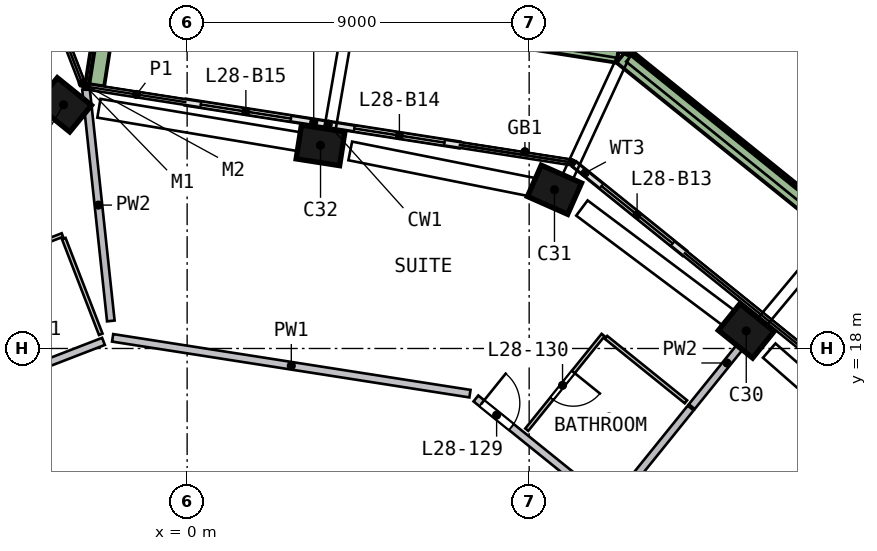
"""IFC4 building model, lengths in metres.
Left out: names, types, materials, properties, quantities, classifications, styles, units other than length and angle.
Written with IfcOpenShell. Run it as: python <this file> out.ifc"""

import sys

from ifc_helpers import new_model, si_unit, direction, frame, frame_2d, origin, origin_2d, place, context, subcontext, project, spatial, rectangle, extrude, element, fill, save


model = new_model("IFC4")
c1 = context("Model", 3, precision=1e-05, world=origin(), true_north=direction((0.0, 1.0)))
c2 = subcontext(c1, "Body", "Model", "MODEL_VIEW")
j1 = project(units=[si_unit("LENGTHUNIT", "METRE"), si_unit("PLANEANGLEUNIT", "RADIAN")], contexts=[c1])
p1 = place(None, origin())
s1 = spatial("IfcSite", under=j1, at=p1, CompositionType="ELEMENT")
p2 = place(p1, origin())
s2 = spatial("IfcBuilding", under=s1, at=p2, CompositionType="ELEMENT")
p3 = place(p2, frame((0.0, 0.0, 118.5)))
s3 = spatial("IfcBuildingStorey", under=s2, at=p3, CompositionType="ELEMENT", Elevation=118.5)
p4 = place(p3, frame((-3.955, 26.309, 0.0), z_axis=(-0.068478669, -0.1563623, 0.985323045), x_axis=(-0.37143503, 0.920634632, 0.120282553)))
e1 = element("IfcColumn", 1, at=p4, inside=s3, PredefinedType="COLUMN", context=c2, shape_type="SweptSolid", body=[
    extrude(rectangle(XDim=0.8, YDim=0.8, at=origin_2d()), origin(), (0.0, 0.0, 1.0), 3.045),
])
p5 = place(p3, frame((14.819, 18.378, 0.0), z_axis=(-0.087981597, 0.069786874, 0.99367451), x_axis=(-0.773238231, 0.624093395, -0.11229458)))
e2 = element("IfcColumn", 2, at=p5, inside=s3, PredefinedType="COLUMN", context=c2, shape_type="SweptSolid", body=[
    extrude(rectangle(XDim=1.15, YDim=0.9, at=origin_2d()), origin(), (0.0, 0.0, 1.0), 3.019),
])
p6 = place(p3, frame((9.794, 22.122, 0.0), z_axis=(-0.105576619, 0.045755258, 0.993357959), x_axis=(0.908058308, -0.402729542, 0.11506096)))
e3 = element("IfcColumn", 3, at=p6, inside=s3, PredefinedType="COLUMN", context=c2, shape_type="SweptSolid", body=[
    extrude(rectangle(XDim=1.15, YDim=0.9, at=origin_2d()), origin(), (0.0, 0.0, 1.0), 3.02),
])
p7 = place(p3, frame((3.644, 23.325, 0.0), z_axis=(-0.111108905, 0.016415653, 0.993672651), x_axis=(-0.981734689, 0.153568339, -0.112311022)))
e4 = element("IfcColumn", 4, at=p7, inside=s3, PredefinedType="COLUMN", context=c2, shape_type="SweptSolid", body=[
    extrude(rectangle(XDim=1.15, YDim=0.9, at=origin_2d()), origin(), (0.0, 0.0, 1.0), 3.019),
])
p8 = place(p3, frame((-3.112, 24.432, 0.0), z_axis=(-0.116057669, -0.01575992, 0.993117436), x_axis=(0.771555546, -0.631092639, 0.08015061)))
e5 = element("IfcColumn", 5, at=p8, inside=s3, PredefinedType="COLUMN", context=c2, shape_type="SweptSolid", body=[
    extrude(rectangle(XDim=1.15, YDim=0.9, at=origin_2d()), origin(), (0.0, 0.0, 1.0), 3.021),
])
p9 = place(p3, frame((13.086, 20.514, 0.0), z_axis=(0.0, 0.0, 1.0), x_axis=(-0.778455565, 0.627699716, 0.0)))
e6 = element("IfcWall", 6, at=p9, inside=s3, PredefinedType="SOLIDWALL", context=c2, shape_type="SweptSolid", body=[
    extrude(rectangle(XDim=3.71, YDim=0.15, at=frame_2d((1.855, 0.0))), origin(), (0.0, 0.0, 1.0), 2.935),
])
p10 = place(p9, frame((0.4, 0.0, 0.0)))
e7 = element("IfcOpeningElement", 7, at=p10, cuts=e6, PredefinedType="OPENING", context=c2, shape_type="SweptSolid", body=[
    extrude(rectangle(XDim=2.4, YDim=2.4, at=frame_2d((1.2, 1.2))), frame((0.0, 0.085, 0.0), z_axis=(0.0, -1.0, 0.0), x_axis=(1.0, 0.0, 0.0)), (0.0, 0.0, 1.0), 0.17),
])
p11 = place(p3, frame((7.167, 23.357, 0.0), z_axis=(0.0, 0.0, 1.0), x_axis=(-0.988005, 0.154421887, 0.0)))
e8 = element("IfcWall", 8, at=p11, inside=s3, PredefinedType="SOLIDWALL", context=c2, shape_type="SweptSolid", body=[
    extrude(rectangle(XDim=3.475, YDim=0.15, at=frame_2d((1.738, 0.0))), origin(), (0.0, 0.0, 1.0), 2.935),
])
p12 = place(p11, frame((0.4, 0.0, 0.0)))
e9 = element("IfcOpeningElement", 9, at=p12, cuts=e8, PredefinedType="OPENING", context=c2, shape_type="SweptSolid", body=[
    extrude(rectangle(XDim=2.4, YDim=2.4, at=frame_2d((1.2, 1.2))), frame((0.0, 0.085, 0.0), z_axis=(0.0, -1.0, 0.0), x_axis=(1.0, 0.0, 0.0)), (0.0, 0.0, 1.0), 0.17),
])
p13 = place(p3, frame((3.733, 23.894, 0.0), z_axis=(0.0, 0.0, 1.0), x_axis=(-0.98801905, 0.154331968, 0.0)))
e10 = element("IfcWall", 10, at=p13, inside=s3, PredefinedType="SOLIDWALL", context=c2, shape_type="SweptSolid", body=[
    extrude(rectangle(XDim=3.814, YDim=0.15, at=frame_2d((1.907, 0.0))), origin(), (0.0, 0.0, 1.0), 2.935),
])
p14 = place(p13, frame((1.014, 0.0, 0.0)))
e11 = element("IfcOpeningElement", 11, at=p14, cuts=e10, PredefinedType="OPENING", context=c2, shape_type="SweptSolid", body=[
    extrude(rectangle(XDim=2.4, YDim=2.4, at=frame_2d((1.2, 1.2))), frame((0.0, 0.085, 0.0), z_axis=(0.0, -1.0, 0.0), x_axis=(1.0, 0.0, 0.0)), (0.0, 0.0, 1.0), 0.17),
])
p15 = place(p3, frame((21.749, 17.415, 0.0), z_axis=(0.0, 0.0, 1.0), x_axis=(-0.778460183, 0.627693988, 0.0)))
e12 = element("IfcWall", 12, at=p15, inside=s3, PredefinedType="SOLIDWALL", context=c2, shape_type="SweptSolid", body=[
    extrude(rectangle(XDim=13.223, YDim=0.5, at=frame_2d((6.612, 0.0))), origin(), (0.0, 0.0, 1.0), 0.7),
])
p16 = place(p3, frame((11.337, 25.767, 0.0), z_axis=(0.0, 0.0, 1.0), x_axis=(-0.988014238, 0.15436277, 0.0)))
e13 = element("IfcWall", 13, at=p16, inside=s3, PredefinedType="SOLIDWALL", context=c2, shape_type="SweptSolid", body=[
    extrude(rectangle(XDim=13.724, YDim=0.5, at=frame_2d((6.862, 0.0))), origin(), (0.0, 0.0, 1.0), 0.7),
])
p17 = place(p3, frame((-2.014, 27.6, 0.0), z_axis=(0.0, 0.0, 1.0), x_axis=(-0.154313416, -0.988021948, 0.0)))
e14 = element("IfcWall", 14, at=p17, inside=s3, PredefinedType="SOLIDWALL", context=c2, shape_type="SweptSolid", body=[
    extrude(rectangle(XDim=2.699, YDim=0.5, at=frame_2d((1.35, 0.0))), origin(), (0.0, 0.0, 1.0), 0.7),
])
p18 = place(p3, frame((-2.201, 18.187, 0.0), z_axis=(0.0, 0.0, 1.0), x_axis=(-0.932828306, -0.360321179, 0.0)))
e15 = element("IfcWall", 15, at=p18, inside=s3, PredefinedType="SOLIDWALL", context=c2, shape_type="SweptSolid", body=[
    extrude(rectangle(XDim=3.4, YDim=0.2, at=frame_2d((1.7, 0.0))), origin(), (0.0, 0.0, 1.0), 3.0),
])
p19 = place(p3, frame((7.442, 16.811, 0.0), z_axis=(0.0, 0.0, 1.0), x_axis=(-0.988012767, 0.154372184, 0.0)))
e16 = element("IfcWall", 16, at=p19, inside=s3, PredefinedType="SOLIDWALL", context=c2, shape_type="SweptSolid", body=[
    extrude(rectangle(XDim=9.516, YDim=0.2, at=frame_2d((4.758, 0.0))), origin(), (0.0, 0.0, 1.0), 3.0),
])
p20 = place(p3, frame((7.599, 16.685, 0.0), z_axis=(0.0, 0.0, 1.0), x_axis=(0.778469608, -0.6276823, 0.0)))
e17 = element("IfcWall", 17, at=p20, inside=s3, PredefinedType="SOLIDWALL", context=c2, shape_type="SweptSolid", body=[
    extrude(rectangle(XDim=9.115, YDim=0.2, at=frame_2d((4.558, 0.0))), origin(), (0.0, 0.0, 1.0), 3.0),
])
p21 = place(p20, frame((0.2, 0.0, 0.0)))
e18 = element("IfcOpeningElement", 18, at=p21, cuts=e17, PredefinedType="OPENING", context=c2, shape_type="SweptSolid", body=[
    extrude(rectangle(XDim=1.0, YDim=2.1, at=frame_2d((0.5, 1.05))), frame((0.0, 0.11, 0.0), z_axis=(0.0, -1.0, 0.0), x_axis=(1.0, 0.0, 0.0)), (0.0, 0.0, 1.0), 0.22),
])
p22 = place(p3, frame((-2.661, 24.822, 0.0), z_axis=(0.0, 0.0, 1.0), x_axis=(0.10658092, -0.994304032, 0.0)))
e19 = element("IfcWall", 19, at=p22, inside=s3, PredefinedType="SOLIDWALL", context=c2, shape_type="SweptSolid", body=[
    extrude(rectangle(XDim=6.132, YDim=0.2, at=frame_2d((3.066, 0.0))), origin(), (0.0, 0.0, 1.0), 3.0),
])
p23 = place(p3, frame((11.427, 14.172, 0.0), z_axis=(0.0, 0.0, 1.0), x_axis=(0.62768345, 0.778468681, 0.0)))
e20 = element("IfcWall", 20, at=p23, inside=s3, PredefinedType="SOLIDWALL", context=c2, shape_type="SweptSolid", body=[
    extrude(rectangle(XDim=2.905, YDim=0.2, at=frame_2d((1.452, 0.0))), origin(), (0.0, 0.0, 1.0), 3.0),
])
p24 = place(p3, frame((13.28, 16.469, 0.0), z_axis=(0.0, 0.0, 1.0), x_axis=(0.627736285, 0.778426076, 0.0)))
e21 = element("IfcWall", 21, at=p24, inside=s3, PredefinedType="SOLIDWALL", context=c2, shape_type="SweptSolid", body=[
    extrude(rectangle(XDim=2.952, YDim=0.2, at=frame_2d((1.476, 0.0))), origin(), (0.0, 0.0, 1.0), 3.0),
])
p25 = place(p3, frame((-3.282, 20.985, 0.0), z_axis=(0.0, 0.0, 1.0), x_axis=(-0.93285117, -0.36026198, 0.0)))
e22 = element("IfcWall", 22, at=p25, inside=s3, PredefinedType="PARTITIONING", context=c2, shape_type="SweptSolid", body=[
    extrude(rectangle(XDim=3.2, YDim=0.1, at=frame_2d((1.6, 0.0))), origin(), (0.0, 0.0, 1.0), 3.0),
])
p26 = place(p25, frame((1.25, 0.0, 0.0)))
e23 = element("IfcOpeningElement", 23, at=p26, cuts=e22, PredefinedType="OPENING", context=c2, shape_type="SweptSolid", body=[
    extrude(rectangle(XDim=0.9, YDim=2.1, at=frame_2d((0.45, 1.05))), frame((0.0, 0.06, 0.0), z_axis=(0.0, -1.0, 0.0), x_axis=(1.0, 0.0, 0.0)), (0.0, 0.0, 1.0), 0.12),
])
p27 = place(p3, frame((-2.273, 18.374, 0.0), z_axis=(0.0, 0.0, 1.0), x_axis=(-0.36026337, 0.932850633, 0.0)))
e24 = element("IfcWall", 24, at=p27, inside=s3, PredefinedType="PARTITIONING", context=c2, shape_type="SweptSolid", body=[
    extrude(rectangle(XDim=2.7, YDim=0.1, at=frame_2d((1.35, 0.0))), origin(), (0.0, 0.0, 1.0), 3.0),
])
p28 = place(p3, frame((10.946, 18.354, 0.0), z_axis=(0.0, 0.0, 1.0), x_axis=(-0.62769578, -0.778458739, 0.0)))
e25 = element("IfcWall", 25, at=p28, inside=s3, PredefinedType="PARTITIONING", context=c2, shape_type="SweptSolid", body=[
    extrude(rectangle(XDim=3.2, YDim=0.1, at=frame_2d((1.6, 0.0))), origin(), (0.0, 0.0, 1.0), 3.0),
])
p29 = place(p28, frame((1.25, 0.0, 0.0)))
e26 = element("IfcOpeningElement", 26, at=p29, cuts=e25, PredefinedType="OPENING", context=c2, shape_type="SweptSolid", body=[
    extrude(rectangle(XDim=0.9, YDim=2.1, at=frame_2d((0.45, 1.05))), frame((0.0, 0.06, 0.0), z_axis=(0.0, -1.0, 0.0), x_axis=(1.0, 0.0, 0.0)), (0.0, 0.0, 1.0), 0.12),
])
p30 = place(p3, frame((11.023, 18.291, 0.0), z_axis=(0.0, 0.0, 1.0), x_axis=(0.778445821, -0.6277118, 0.0)))
e27 = element("IfcWall", 27, at=p30, inside=s3, PredefinedType="PARTITIONING", context=c2, shape_type="SweptSolid", body=[
    extrude(rectangle(XDim=2.7, YDim=0.1, at=frame_2d((1.35, 0.0))), origin(), (0.0, 0.0, 1.0), 3.0),
])
p31 = place(p10, origin())
e28 = element("IfcDoor", 28, at=p31, inside=s3, OperationType="SLIDING_TO_RIGHT", PredefinedType="DOOR", context=c2, shape_type="SweptSolid", body=[
    extrude(rectangle(XDim=2.4, YDim=2.4, at=frame_2d((1.2, 1.2))), frame((0.0, 0.025, 0.0), z_axis=(0.0, -1.0, 0.0), x_axis=(1.0, 0.0, 0.0)), (0.0, 0.0, 1.0), 0.05),
])
fill(e7, e28)
p32 = place(p12, origin())
e29 = element("IfcDoor", 29, at=p32, inside=s3, OperationType="SLIDING_TO_RIGHT", PredefinedType="DOOR", context=c2, shape_type="SweptSolid", body=[
    extrude(rectangle(XDim=2.4, YDim=2.4, at=frame_2d((1.2, 1.2))), frame((0.0, 0.025, 0.0), z_axis=(0.0, -1.0, 0.0), x_axis=(1.0, 0.0, 0.0)), (0.0, 0.0, 1.0), 0.05),
])
fill(e9, e29)
p33 = place(p14, origin())
e30 = element("IfcDoor", 30, at=p33, inside=s3, OperationType="SLIDING_TO_LEFT", PredefinedType="DOOR", context=c2, shape_type="SweptSolid", body=[
    extrude(rectangle(XDim=2.4, YDim=2.4, at=frame_2d((1.2, 1.2))), frame((0.0, 0.025, 0.0), z_axis=(0.0, -1.0, 0.0), x_axis=(1.0, 0.0, 0.0)), (0.0, 0.0, 1.0), 0.05),
])
fill(e11, e30)
p34 = place(p21, origin())
e31 = element("IfcDoor", 31, at=p34, inside=s3, OperationType="SINGLE_SWING_LEFT", PredefinedType="DOOR", context=c2, shape_type="SweptSolid", body=[
    extrude(rectangle(XDim=1.0, YDim=2.1, at=frame_2d((0.5, 1.05))), frame((0.0, 0.025, 0.0), z_axis=(0.0, -1.0, 0.0), x_axis=(1.0, 0.0, 0.0)), (0.0, 0.0, 1.0), 0.05),
])
fill(e18, e31)
p35 = place(p29, origin())
e32 = element("IfcDoor", 32, at=p35, inside=s3, OperationType="SINGLE_SWING_LEFT", PredefinedType="DOOR", context=c2, shape_type="SweptSolid", body=[
    extrude(rectangle(XDim=0.9, YDim=2.1, at=frame_2d((0.45, 1.05))), frame((0.0, 0.025, 0.0), z_axis=(0.0, -1.0, 0.0), x_axis=(1.0, 0.0, 0.0)), (0.0, 0.0, 1.0), 0.05),
])
fill(e26, e32)
save(model, sys.argv[1])
